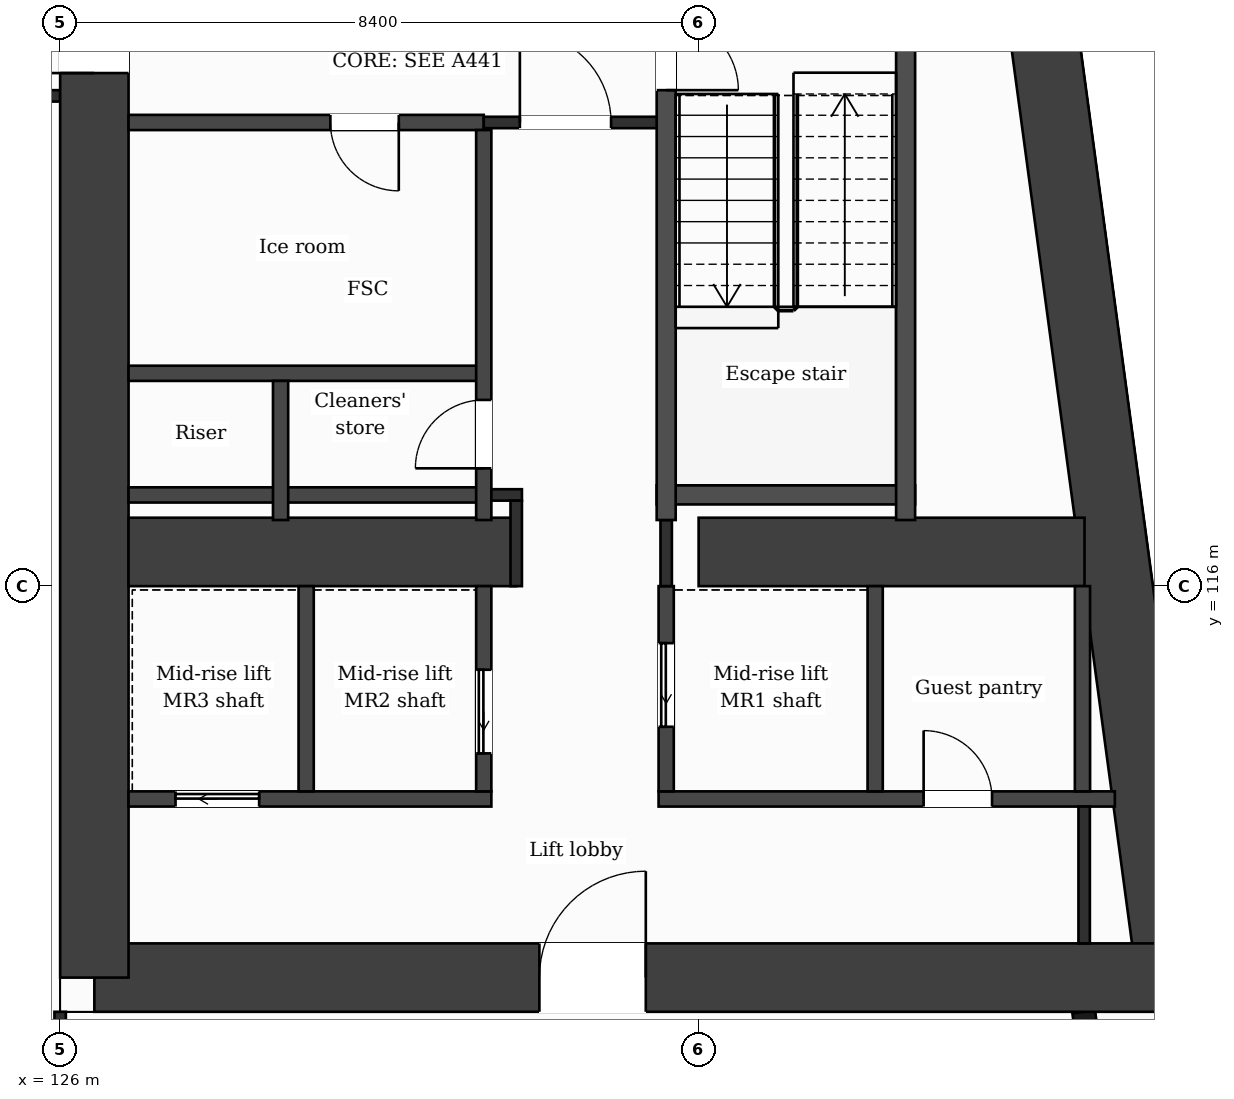
"""IFC4 building model, lengths in metres.
Left out: names, types, materials, properties, quantities, classifications, styles, units other than length and angle.
Written with IfcOpenShell. Run it as: python <this file> out.ifc"""

import sys

from ifc_helpers import new_model, si_unit, direction, frame, frame_2d, origin, place, context, subcontext, project, spatial, rectangle, extrude, element, fill, save


model = new_model("IFC4")
c1 = context("Model", 3, precision=1e-05, world=origin(), true_north=direction((0.0, 1.0)))
c2 = subcontext(c1, "Body", "Model", "MODEL_VIEW")
j1 = project(units=[si_unit("LENGTHUNIT", "METRE"), si_unit("PLANEANGLEUNIT", "RADIAN")], contexts=[c1])
p1 = place(None, origin())
s1 = spatial("IfcSite", under=j1, at=p1, CompositionType="ELEMENT")
p2 = place(p1, origin())
s2 = spatial("IfcBuilding", under=s1, at=p2, CompositionType="ELEMENT")
p3 = place(p2, frame((0.0, 0.0, 170.0)))
s3 = spatial("IfcBuildingStorey", under=s2, at=p3, CompositionType="ELEMENT", Elevation=170.0)
p4 = place(p3, frame((137.776, 131.95, 0.0), z_axis=(0.0, 0.0, 1.0), x_axis=(0.133421759112, -0.991059349482, 0.0)))
e1 = element("IfcWall", 1, at=p4, inside=s3, PredefinedType="SHEAR", context=c2, shape_type="SweptSolid", body=[
    extrude(rectangle(XDim=21.29, YDim=0.9, at=frame_2d((10.645, 0.0))), origin(), (0.0, 0.0, 1.0), 3.7),
])
p5 = place(p3, frame((140.616, 110.85, 0.0), z_axis=(0.0, 0.0, 1.0), x_axis=(-1.0, 0.0, 0.0)))
e2 = element("IfcWall", 2, at=p5, inside=s3, PredefinedType="SHEAR", context=c2, shape_type="SweptSolid", body=[
    extrude(rectangle(XDim=14.166, YDim=0.9, at=frame_2d((7.083, 0.0))), origin(), (0.0, 0.0, 1.0), 3.7),
])
p6 = place(p5, frame((6.911, 0.0, 0.0)))
e3 = element("IfcOpeningElement", 3, at=p6, cuts=e2, PredefinedType="OPENING", context=c2, shape_type="SweptSolid", body=[
    extrude(rectangle(XDim=1.4, YDim=2.1, at=frame_2d((0.7, 1.05))), frame((0.0, 0.46, 0.0), z_axis=(0.0, -1.0, 0.0), x_axis=(1.0, 0.0, 0.0)), (0.0, 0.0, 1.0), 0.92),
])
p7 = place(p3, frame((126.45, 110.85, 0.0), z_axis=(0.0, 0.0, 1.0), x_axis=(0.0, 1.0, 0.0)))
e4 = element("IfcWall", 4, at=p7, inside=s3, PredefinedType="SHEAR", context=c2, shape_type="SweptSolid", body=[
    extrude(rectangle(XDim=21.1, YDim=0.9, at=frame_2d((10.55, 0.0))), origin(), (0.0, 0.0, 1.0), 3.7),
])
p8 = place(p7, frame((11.9, 0.0, 0.0)))
e5 = element("IfcOpeningElement", 5, at=p8, cuts=e4, PredefinedType="OPENING", context=c2, shape_type="SweptSolid", body=[
    extrude(rectangle(XDim=1.4, YDim=2.1, at=frame_2d((0.7, 1.05))), frame((0.0, 0.46, 0.0), z_axis=(0.0, -1.0, 0.0), x_axis=(1.0, 0.0, 0.0)), (0.0, 0.0, 1.0), 0.92),
])
p9 = place(p3, frame((126.9, 116.45, 0.0), z_axis=(0.0, 0.0, 1.0), x_axis=(1.0, 0.0, 0.0)))
e6 = element("IfcWall", 6, at=p9, inside=s3, PredefinedType="SHEAR", context=c2, shape_type="SweptSolid", body=[
    extrude(rectangle(XDim=5.1, YDim=0.9, at=frame_2d((2.55, 0.0))), origin(), (0.0, 0.0, 1.0), 3.7),
])
p10 = place(p3, frame((134.4, 116.45, 0.0), z_axis=(0.0, 0.0, 1.0), x_axis=(1.0, 0.0, 0.0)))
e7 = element("IfcWall", 7, at=p10, inside=s3, PredefinedType="SHEAR", context=c2, shape_type="SweptSolid", body=[
    extrude(rectangle(XDim=5.077, YDim=0.9, at=frame_2d((2.539, 0.0))), origin(), (0.0, 0.0, 1.0), 3.7),
])
p11 = place(p3, frame((140.348, 103.85, 0.0), z_axis=(0.0, 0.0, 1.0), x_axis=(-0.133431549479, 0.991058031401, 0.0)))
e8 = element("IfcWall", 8, at=p11, inside=s3, PredefinedType="SOLIDWALL", context=c2, shape_type="SweptSolid", body=[
    extrude(rectangle(XDim=6.609, YDim=0.3, at=frame_2d((3.304, 0.0))), origin(), (0.0, 0.0, 1.0), 3.38),
])
p12 = place(p11, frame((0.737, 0.0, 0.9)))
e9 = element("IfcOpeningElement", 9, at=p12, cuts=e8, PredefinedType="OPENING", context=c2, shape_type="SweptSolid", body=[
    extrude(rectangle(XDim=1.2, YDim=2.1, at=frame_2d((0.6, 1.05))), frame((0.0, 0.16, 0.0), z_axis=(0.0, -1.0, 0.0), x_axis=(1.0, 0.0, 0.0)), (0.0, 0.0, 1.0), 0.32),
])
p13 = place(p11, frame((3.991, 0.0, 0.0)))
e10 = element("IfcOpeningElement", 10, at=p13, cuts=e8, PredefinedType="OPENING", context=c2, shape_type="SweptSolid", body=[
    extrude(rectangle(XDim=1.2, YDim=2.4, at=frame_2d((0.6, 1.2))), frame((0.0, 0.16, 0.0), z_axis=(0.0, -1.0, 0.0), x_axis=(1.0, 0.0, 0.0)), (0.0, 0.0, 1.0), 0.32),
])
p14 = place(p3, frame((126.9, 113.2, 0.0), z_axis=(0.0, 0.0, 1.0), x_axis=(1.0, 0.0, 0.0)))
e11 = element("IfcWall", 11, at=p14, inside=s3, PredefinedType="PARTITIONING", context=c2, shape_type="SweptSolid", body=[
    extrude(rectangle(XDim=4.773, YDim=0.2, at=frame_2d((2.387, 0.0))), origin(), (0.0, 0.0, 1.0), 3.38),
])
p15 = place(p14, frame((0.618, 0.0, 0.0)))
e12 = element("IfcOpeningElement", 12, at=p15, cuts=e11, PredefinedType="OPENING", context=c2, shape_type="SweptSolid", body=[
    extrude(rectangle(XDim=1.1, YDim=2.1, at=frame_2d((0.55, 1.05))), frame((0.0, 0.11, 0.0), z_axis=(0.0, -1.0, 0.0), x_axis=(1.0, 0.0, 0.0)), (0.0, 0.0, 1.0), 0.22),
])
p16 = place(p3, frame((133.873, 113.2, 0.0), z_axis=(0.0, 0.0, 1.0), x_axis=(1.0, 0.0, 0.0)))
e13 = element("IfcWall", 13, at=p16, inside=s3, PredefinedType="PARTITIONING", context=c2, shape_type="SweptSolid", body=[
    extrude(rectangle(XDim=6.003, YDim=0.2, at=frame_2d((3.001, 0.0))), origin(), (0.0, 0.0, 1.0), 3.38),
])
p17 = place(p16, frame((3.487, 0.0, 0.0)))
e14 = element("IfcOpeningElement", 14, at=p17, cuts=e13, PredefinedType="OPENING", context=c2, shape_type="SweptSolid", body=[
    extrude(rectangle(XDim=0.9, YDim=2.1, at=frame_2d((0.45, 1.05))), frame((0.0, 0.11, 0.0), z_axis=(0.0, -1.0, 0.0), x_axis=(1.0, 0.0, 0.0)), (0.0, 0.0, 1.0), 0.22),
])
p18 = place(p3, frame((126.9, 117.2, 0.0), z_axis=(0.0, 0.0, 1.0), x_axis=(1.0, 0.0, 0.0)))
e15 = element("IfcWall", 15, at=p18, inside=s3, PredefinedType="PARTITIONING", context=c2, shape_type="SweptSolid", body=[
    extrude(rectangle(XDim=4.673, YDim=0.2, at=frame_2d((2.336, 0.0))), origin(), (0.0, 0.0, 1.0), 3.38),
])
p19 = place(p3, frame((131.573, 117.2, 0.0), z_axis=(0.0, 0.0, 1.0), x_axis=(1.0, 0.0, 0.0)))
e16 = element("IfcWall", 16, at=p19, inside=s3, PredefinedType="PARTITIONING", context=c2, shape_type="SweptSolid", body=[
    extrude(rectangle(XDim=0.502, YDim=0.15, at=frame_2d((0.251, 0.0))), origin(), (0.0, 0.0, 1.0), 3.38),
])
p20 = place(p3, frame((133.848, 117.2, 0.0), z_axis=(0.0, 0.0, 1.0), x_axis=(1.0, 0.0, 0.0)))
e17 = element("IfcWall", 17, at=p20, inside=s3, PredefinedType="PARTITIONING", context=c2, shape_type="SweptSolid", body=[
    extrude(rectangle(XDim=3.4, YDim=0.25, at=frame_2d((1.7, 0.0))), origin(), (0.0, 0.0, 1.0), 3.38),
])
p21 = place(p3, frame((126.9, 118.8, 0.0), z_axis=(0.0, 0.0, 1.0), x_axis=(1.0, 0.0, 0.0)))
e18 = element("IfcWall", 18, at=p21, inside=s3, PredefinedType="PARTITIONING", context=c2, shape_type="SweptSolid", body=[
    extrude(rectangle(XDim=4.673, YDim=0.2, at=frame_2d((2.336, 0.0))), origin(), (0.0, 0.0, 1.0), 3.38),
])
p22 = place(p3, frame((126.9, 122.1, 0.0), z_axis=(0.0, 0.0, 1.0), x_axis=(1.0, 0.0, 0.0)))
e19 = element("IfcWall", 19, at=p22, inside=s3, PredefinedType="PARTITIONING", context=c2, shape_type="SweptSolid", body=[
    extrude(rectangle(XDim=4.673, YDim=0.2, at=frame_2d((2.336, 0.0))), origin(), (0.0, 0.0, 1.0), 3.38),
])
p23 = place(p22, frame((2.655, 0.0, 0.0)))
e20 = element("IfcOpeningElement", 20, at=p23, cuts=e19, PredefinedType="OPENING", context=c2, shape_type="SweptSolid", body=[
    extrude(rectangle(XDim=0.9, YDim=2.1, at=frame_2d((0.45, 1.05))), frame((0.0, 0.11, 0.0), z_axis=(0.0, -1.0, 0.0), x_axis=(1.0, 0.0, 0.0)), (0.0, 0.0, 1.0), 0.22),
])
p24 = place(p3, frame((131.573, 122.1, 0.0), z_axis=(0.0, 0.0, 1.0), x_axis=(1.0, 0.0, 0.0)))
e21 = element("IfcWall", 21, at=p24, inside=s3, PredefinedType="PARTITIONING", context=c2, shape_type="SweptSolid", body=[
    extrude(rectangle(XDim=2.4, YDim=0.15, at=frame_2d((1.2, 0.0))), origin(), (0.0, 0.0, 1.0), 3.38),
])
p25 = place(p24, frame((0.475, 0.0, 0.0)))
e22 = element("IfcOpeningElement", 22, at=p25, cuts=e21, PredefinedType="OPENING", context=c2, shape_type="SweptSolid", body=[
    extrude(rectangle(XDim=1.2, YDim=2.1, at=frame_2d((0.6, 1.05))), frame((0.0, 0.085, 0.0), z_axis=(0.0, -1.0, 0.0), x_axis=(1.0, 0.0, 0.0)), (0.0, 0.0, 1.0), 0.17),
])
p26 = place(p3, frame((100.8, 122.45, 0.0), z_axis=(0.0, 0.0, 1.0), x_axis=(1.0, 0.0, 0.0)))
e23 = element("IfcWall", 23, at=p26, inside=s3, PredefinedType="PARTITIONING", context=c2, shape_type="SweptSolid", body=[
    extrude(rectangle(XDim=25.2, YDim=0.15, at=frame_2d((12.6, 0.0))), origin(), (0.0, 0.0, 1.0), 3.38),
])
p27 = place(p3, frame((126.0, 109.075, 0.0), z_axis=(0.0, 0.0, 1.0), x_axis=(0.0, 1.0, 0.0)))
e24 = element("IfcWall", 24, at=p27, inside=s3, PredefinedType="PARTITIONING", context=c2, shape_type="SweptSolid", body=[
    extrude(rectangle(XDim=1.325, YDim=0.15, at=frame_2d((0.663, 0.0))), origin(), (0.0, 0.0, 1.0), 3.38),
])
p28 = place(p3, frame((128.9, 116.87, 0.0), z_axis=(0.0, 0.0, 1.0), x_axis=(0.0, 1.0, 0.0)))
e25 = element("IfcWall", 25, at=p28, inside=s3, PredefinedType="PARTITIONING", context=c2, shape_type="SweptSolid", body=[
    extrude(rectangle(XDim=1.83, YDim=0.2, at=frame_2d((0.915, 0.0))), origin(), (0.0, 0.0, 1.0), 3.38),
])
p29 = place(p3, frame((129.237, 113.3, 0.0), z_axis=(0.0, 0.0, 1.0), x_axis=(0.0, 1.0, 0.0)))
e26 = element("IfcWall", 26, at=p29, inside=s3, PredefinedType="PARTITIONING", context=c2, shape_type="SweptSolid", body=[
    extrude(rectangle(XDim=2.7, YDim=0.2, at=frame_2d((1.35, 0.0))), origin(), (0.0, 0.0, 1.0), 3.38),
])
p30 = place(p3, frame((131.573, 113.3, 0.0), z_axis=(0.0, 0.0, 1.0), x_axis=(0.0, 1.0, 0.0)))
e27 = element("IfcWall", 27, at=p30, inside=s3, PredefinedType="PARTITIONING", context=c2, shape_type="SweptSolid", body=[
    extrude(rectangle(XDim=2.7, YDim=0.2, at=frame_2d((1.35, 0.0))), origin(), (0.0, 0.0, 1.0), 3.38),
])
p31 = place(p30, frame((0.5, 0.0, 0.0)))
e28 = element("IfcOpeningElement", 28, at=p31, cuts=e27, PredefinedType="OPENING", context=c2, shape_type="SweptSolid", body=[
    extrude(rectangle(XDim=1.1, YDim=2.1, at=frame_2d((0.55, 1.05))), frame((0.0, 0.11, 0.0), z_axis=(0.0, -1.0, 0.0), x_axis=(1.0, 0.0, 0.0)), (0.0, 0.0, 1.0), 0.22),
])
p32 = place(p3, frame((131.573, 116.87, 0.0), z_axis=(0.0, 0.0, 1.0), x_axis=(0.0, 1.0, 0.0)))
e29 = element("IfcWall", 29, at=p32, inside=s3, PredefinedType="PARTITIONING", context=c2, shape_type="SweptSolid", body=[
    extrude(rectangle(XDim=5.13, YDim=0.2, at=frame_2d((2.565, 0.0))), origin(), (0.0, 0.0, 1.0), 3.38),
])
p33 = place(p32, frame((0.68, 0.0, 0.0)))
e30 = element("IfcOpeningElement", 30, at=p33, cuts=e29, PredefinedType="OPENING", context=c2, shape_type="SweptSolid", body=[
    extrude(rectangle(XDim=0.9, YDim=2.1, at=frame_2d((0.45, 1.05))), frame((0.0, 0.11, 0.0), z_axis=(0.0, -1.0, 0.0), x_axis=(1.0, 0.0, 0.0)), (0.0, 0.0, 1.0), 0.22),
])
p34 = place(p3, frame((132.0, 116.0, 0.0), z_axis=(0.0, 0.0, 1.0), x_axis=(0.0, 1.0, 0.0)))
e31 = element("IfcWall", 31, at=p34, inside=s3, PredefinedType="PARTITIONING", context=c2, shape_type="SweptSolid", body=[
    extrude(rectangle(XDim=1.125, YDim=0.15, at=frame_2d((0.562, 0.0))), origin(), (0.0, 0.0, 1.0), 3.38),
])
p35 = place(p3, frame((133.973, 113.3, 0.0), z_axis=(0.0, 0.0, 1.0), x_axis=(0.0, 1.0, 0.0)))
e32 = element("IfcWall", 32, at=p35, inside=s3, PredefinedType="PARTITIONING", context=c2, shape_type="SweptSolid", body=[
    extrude(rectangle(XDim=2.7, YDim=0.2, at=frame_2d((1.35, 0.0))), origin(), (0.0, 0.0, 1.0), 3.38),
])
p36 = place(p35, frame((0.85, 0.0, 0.0)))
e33 = element("IfcOpeningElement", 33, at=p36, cuts=e32, PredefinedType="OPENING", context=c2, shape_type="SweptSolid", body=[
    extrude(rectangle(XDim=1.1, YDim=2.1, at=frame_2d((0.55, 1.05))), frame((0.0, 0.11, 0.0), z_axis=(0.0, -1.0, 0.0), x_axis=(1.0, 0.0, 0.0)), (0.0, 0.0, 1.0), 0.22),
])
p37 = place(p3, frame((133.973, 116.0, 0.0), z_axis=(0.0, 0.0, 1.0), x_axis=(0.0, 1.0, 0.0)))
e34 = element("IfcWall", 34, at=p37, inside=s3, PredefinedType="PARTITIONING", context=c2, shape_type="SweptSolid", body=[
    extrude(rectangle(XDim=0.87, YDim=0.15, at=frame_2d((0.435, 0.0))), origin(), (0.0, 0.0, 1.0), 3.38),
])
p38 = place(p3, frame((133.973, 116.87, 0.0), z_axis=(0.0, 0.0, 1.0), x_axis=(0.0, 1.0, 0.0)))
e35 = element("IfcWall", 35, at=p38, inside=s3, PredefinedType="PARTITIONING", context=c2, shape_type="SweptSolid", body=[
    extrude(rectangle(XDim=6.955, YDim=0.25, at=frame_2d((3.478, 0.0))), origin(), (0.0, 0.0, 1.0), 3.38),
])
p39 = place(p38, frame((5.655, 0.0, 0.0)))
e36 = element("IfcOpeningElement", 36, at=p39, cuts=e35, PredefinedType="OPENING", context=c2, shape_type="SweptSolid", body=[
    extrude(rectangle(XDim=0.95, YDim=2.1, at=frame_2d((0.475, 1.05))), frame((0.0, 0.135, 0.0), z_axis=(0.0, -1.0, 0.0), x_axis=(1.0, 0.0, 0.0)), (0.0, 0.0, 1.0), 0.27),
])
p40 = place(p3, frame((136.722, 113.3, 0.0), z_axis=(0.0, 0.0, 1.0), x_axis=(0.0, 1.0, 0.0)))
e37 = element("IfcWall", 37, at=p40, inside=s3, PredefinedType="PARTITIONING", context=c2, shape_type="SweptSolid", body=[
    extrude(rectangle(XDim=2.7, YDim=0.2, at=frame_2d((1.35, 0.0))), origin(), (0.0, 0.0, 1.0), 3.38),
])
p41 = place(p3, frame((137.123, 116.87, 0.0), z_axis=(0.0, 0.0, 1.0), x_axis=(0.0, 1.0, 0.0)))
e38 = element("IfcWall", 38, at=p41, inside=s3, PredefinedType="PARTITIONING", context=c2, shape_type="SweptSolid", body=[
    extrude(rectangle(XDim=6.955, YDim=0.25, at=frame_2d((3.478, 0.0))), origin(), (0.0, 0.0, 1.0), 3.38),
])
p42 = place(p3, frame((139.45, 113.3, 0.0), z_axis=(0.0, 0.0, 1.0), x_axis=(0.0, 1.0, 0.0)))
e39 = element("IfcWall", 39, at=p42, inside=s3, PredefinedType="PARTITIONING", context=c2, shape_type="SweptSolid", body=[
    extrude(rectangle(XDim=2.7, YDim=0.2, at=frame_2d((1.35, 0.0))), origin(), (0.0, 0.0, 1.0), 3.38),
])
p43 = place(p3, frame((139.472, 111.3, 0.0), z_axis=(0.0, 0.0, 1.0), x_axis=(0.0, 1.0, 0.0)))
e40 = element("IfcWall", 40, at=p43, inside=s3, PredefinedType="PARTITIONING", context=c2, shape_type="SweptSolid", body=[
    extrude(rectangle(XDim=1.8, YDim=0.15, at=frame_2d((0.9, 0.0))), origin(), (0.0, 0.0, 1.0), 3.38),
])
p44 = place(p25, origin())
e41 = element("IfcDoor", 41, at=p44, inside=s3, OperationType="SINGLE_SWING_LEFT", PredefinedType="DOOR", context=c2, shape_type="SweptSolid", body=[
    extrude(rectangle(XDim=1.2, YDim=2.1, at=frame_2d((0.6, 1.05))), frame((0.0, 0.025, 0.0), z_axis=(0.0, -1.0, 0.0), x_axis=(1.0, 0.0, 0.0)), (0.0, 0.0, 1.0), 0.05),
])
fill(e22, e41)
p45 = place(p23, origin())
e42 = element("IfcDoor", 42, at=p45, inside=s3, OperationType="SINGLE_SWING_RIGHT", PredefinedType="DOOR", context=c2, shape_type="SweptSolid", body=[
    extrude(rectangle(XDim=0.9, YDim=2.1, at=frame_2d((0.45, 1.05))), frame((0.0, 0.025, 0.0), z_axis=(0.0, -1.0, 0.0), x_axis=(1.0, 0.0, 0.0)), (0.0, 0.0, 1.0), 0.05),
])
fill(e20, e42)
p46 = place(p39, origin())
e43 = element("IfcDoor", 43, at=p46, inside=s3, OperationType="SINGLE_SWING_LEFT", PredefinedType="DOOR", context=c2, shape_type="SweptSolid", body=[
    extrude(rectangle(XDim=0.95, YDim=2.1, at=frame_2d((0.475, 1.05))), frame((0.0, 0.025, 0.0), z_axis=(0.0, -1.0, 0.0), x_axis=(1.0, 0.0, 0.0)), (0.0, 0.0, 1.0), 0.05),
])
fill(e36, e43)
p47 = place(p33, origin())
e44 = element("IfcDoor", 44, at=p47, inside=s3, OperationType="SINGLE_SWING_LEFT", PredefinedType="DOOR", context=c2, shape_type="SweptSolid", body=[
    extrude(rectangle(XDim=0.9, YDim=2.1, at=frame_2d((0.45, 1.05))), frame((0.0, 0.025, 0.0), z_axis=(0.0, -1.0, 0.0), x_axis=(1.0, 0.0, 0.0)), (0.0, 0.0, 1.0), 0.05),
])
fill(e30, e44)
p48 = place(p36, origin())
e45 = element("IfcDoor", 45, at=p48, inside=s3, OperationType="SLIDING_TO_LEFT", PredefinedType="DOOR", context=c2, shape_type="SweptSolid", body=[
    extrude(rectangle(XDim=1.1, YDim=2.1, at=frame_2d((0.55, 1.05))), frame((0.0, 0.025, 0.0), z_axis=(0.0, -1.0, 0.0), x_axis=(1.0, 0.0, 0.0)), (0.0, 0.0, 1.0), 0.05),
])
fill(e33, e45)
p49 = place(p31, origin())
e46 = element("IfcDoor", 46, at=p49, inside=s3, OperationType="SLIDING_TO_LEFT", PredefinedType="DOOR", context=c2, shape_type="SweptSolid", body=[
    extrude(rectangle(XDim=1.1, YDim=2.1, at=frame_2d((0.55, 1.05))), frame((0.0, 0.025, 0.0), z_axis=(0.0, -1.0, 0.0), x_axis=(1.0, 0.0, 0.0)), (0.0, 0.0, 1.0), 0.05),
])
fill(e28, e46)
p50 = place(p15, origin())
e47 = element("IfcDoor", 47, at=p50, inside=s3, OperationType="SLIDING_TO_LEFT", PredefinedType="DOOR", context=c2, shape_type="SweptSolid", body=[
    extrude(rectangle(XDim=1.1, YDim=2.1, at=frame_2d((0.55, 1.05))), frame((0.0, 0.025, 0.0), z_axis=(0.0, -1.0, 0.0), x_axis=(1.0, 0.0, 0.0)), (0.0, 0.0, 1.0), 0.05),
])
fill(e12, e47)
p51 = place(p17, origin())
e48 = element("IfcDoor", 48, at=p51, inside=s3, OperationType="SINGLE_SWING_LEFT", PredefinedType="DOOR", context=c2, shape_type="SweptSolid", body=[
    extrude(rectangle(XDim=0.9, YDim=2.1, at=frame_2d((0.45, 1.05))), frame((0.0, 0.025, 0.0), z_axis=(0.0, -1.0, 0.0), x_axis=(1.0, 0.0, 0.0)), (0.0, 0.0, 1.0), 0.05),
])
fill(e14, e48)
p52 = place(p6, origin())
e49 = element("IfcDoor", 49, at=p52, inside=s3, OperationType="SINGLE_SWING_LEFT", PredefinedType="DOOR", context=c2, shape_type="SweptSolid", body=[
    extrude(rectangle(XDim=1.4, YDim=2.1, at=frame_2d((0.7, 1.05))), frame((0.0, 0.025, 0.0), z_axis=(0.0, -1.0, 0.0), x_axis=(1.0, 0.0, 0.0)), (0.0, 0.0, 1.0), 0.05),
])
fill(e3, e49)
p53 = place(p8, origin())
e50 = element("IfcDoor", 50, at=p53, inside=s3, OperationType="SINGLE_SWING_LEFT", PredefinedType="DOOR", context=c2, shape_type="SweptSolid", body=[
    extrude(rectangle(XDim=1.4, YDim=2.1, at=frame_2d((0.7, 1.05))), frame((0.0, 0.025, 0.0), z_axis=(0.0, -1.0, 0.0), x_axis=(1.0, 0.0, 0.0)), (0.0, 0.0, 1.0), 0.05),
])
fill(e5, e50)
save(model, sys.argv[1])
